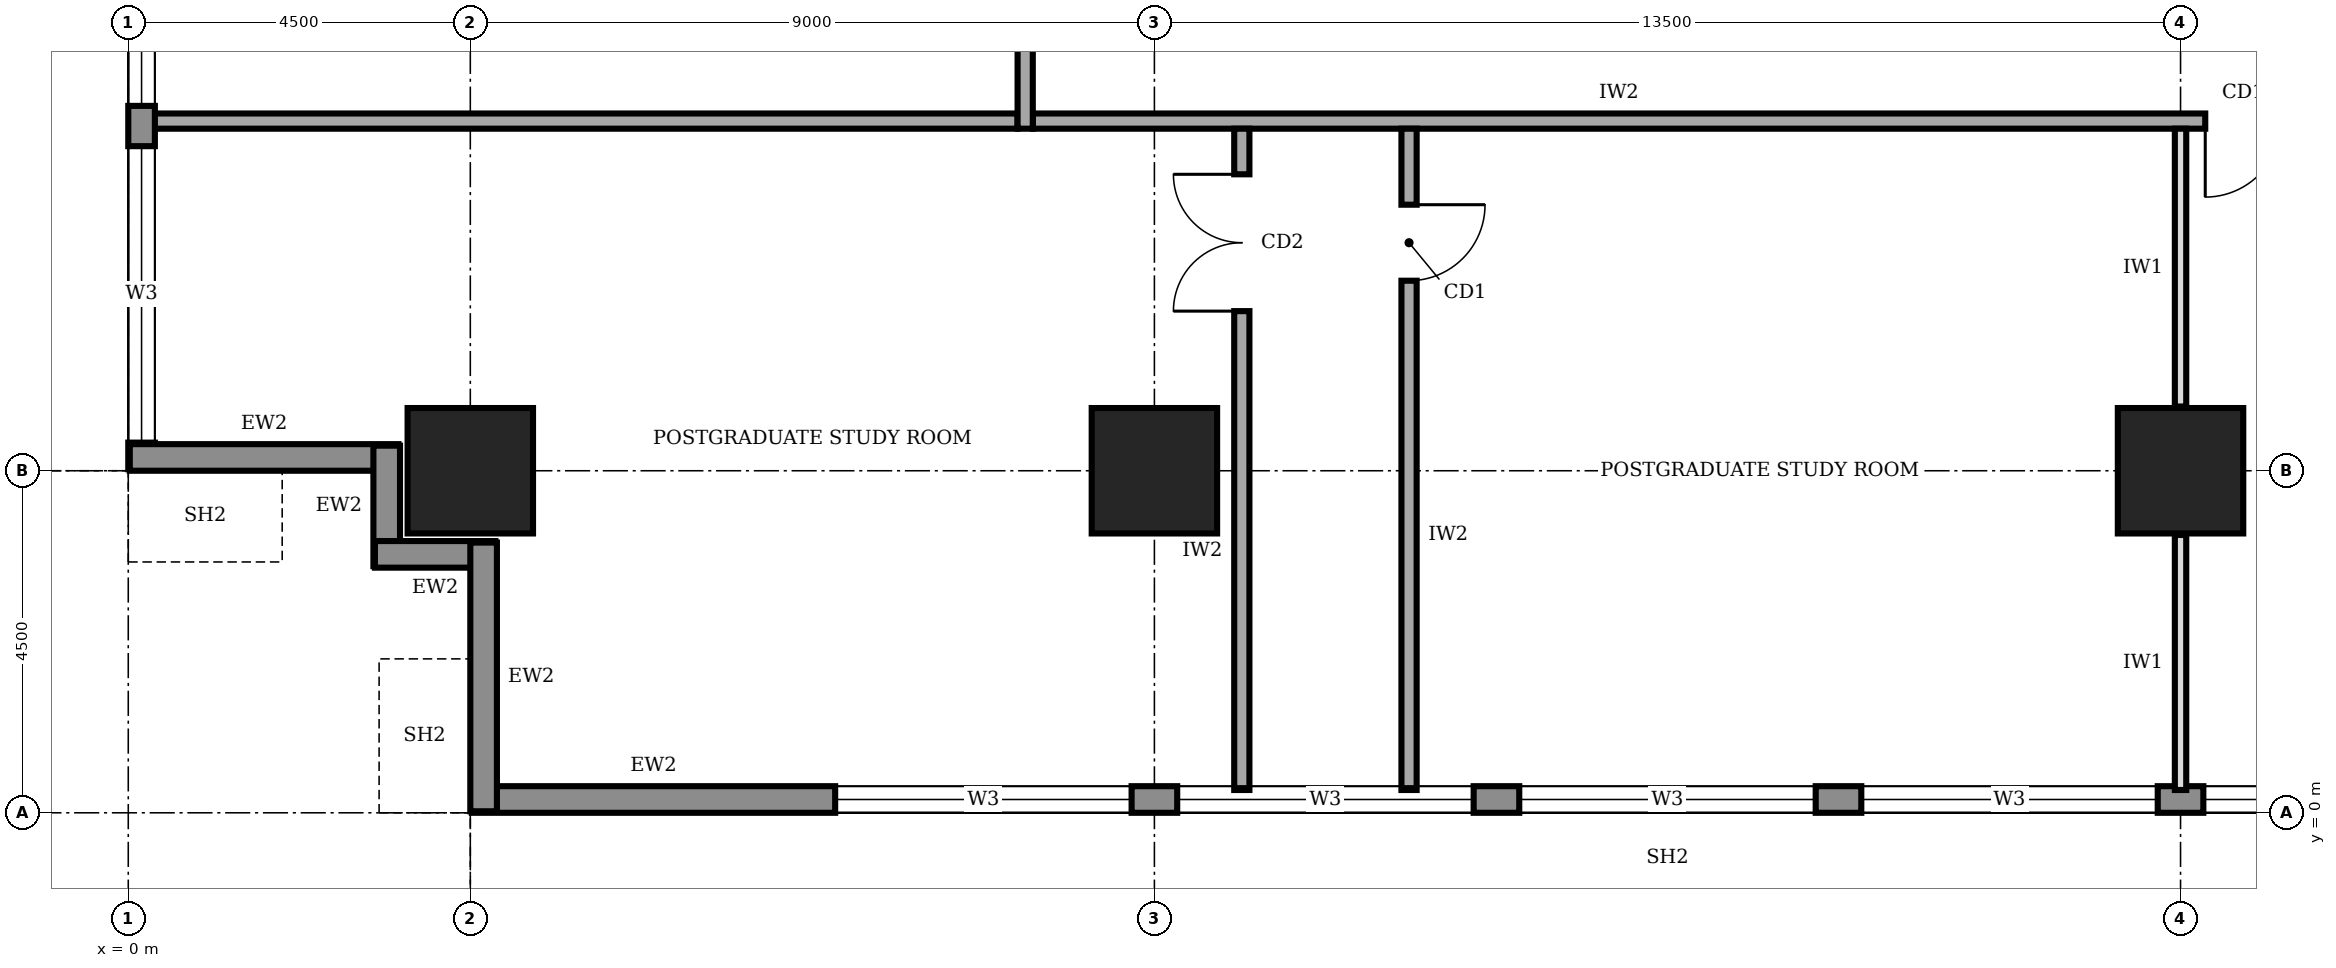
"""IFC4 building model, lengths in metres.
Left out: names, types, materials, properties, quantities, classifications, styles, units other than length and angle.
Written with IfcOpenShell. Run it as: python <this file> out.ifc"""

import sys

from ifc_helpers import new_model, si_unit, direction, frame, frame_2d, origin, origin_2d, place, context, subcontext, project, spatial, rectangle, extrude, element, fill, save


model = new_model("IFC4")
c1 = context("Model", 3, precision=1e-05, world=origin(), true_north=direction((0.0, 1.0)))
c2 = subcontext(c1, "Body", "Model", "MODEL_VIEW")
j1 = project(units=[si_unit("LENGTHUNIT", "METRE"), si_unit("PLANEANGLEUNIT", "RADIAN")], contexts=[c1])
p1 = place(None, origin())
s1 = spatial("IfcSite", under=j1, at=p1, CompositionType="ELEMENT")
p2 = place(p1, origin())
s2 = spatial("IfcBuilding", under=s1, at=p2, CompositionType="ELEMENT")
p3 = place(p2, frame((0.0, 0.0, 181.0)))
s3 = spatial("IfcBuildingStorey", under=s2, at=p3, CompositionType="ELEMENT", Elevation=181.0)
for number, where, z_axis, x_axis in (
    (1, (4.5, 4.5, 0.0), (0.0, 0.0, 1.0), (1.0, 0.0, 0.0)),
    (2, (13.5, 4.5, 0.0), (0.0, 0.0, 1.0), (1.0, 0.0, 0.0)),
    (3, (27.0, 4.5, 0.0), (0.0, 0.0, 1.0), (1.0, 0.0, 0.0)),
):
    element("IfcColumn", number, at=place(p3, frame(where, z_axis=z_axis, x_axis=x_axis)), inside=s3, PredefinedType="COLUMN", context=c2, shape_type="SweptSolid", body=[
        extrude(rectangle(XDim=1.65, YDim=1.65, at=origin_2d()), origin(), (0.0, 0.0, 1.0), 4.0),
    ])
p4 = place(p3, frame((4.52, 0.175, 0.0), z_axis=(0.0, 0.0, 1.0), x_axis=(1.0, 0.0, 0.0)))
e4 = element("IfcWall", 4, at=p4, inside=s3, PredefinedType="STANDARD", context=c2, shape_type="SweptSolid", body=[
    extrude(rectangle(XDim=31.46, YDim=0.35, at=frame_2d((15.73, 0.0))), origin(), (0.0, 0.0, 1.0), 3.75),
])
p5 = place(p4, frame((4.78, 0.0, 0.95)))
e5 = element("IfcOpeningElement", 5, at=p5, cuts=e4, PredefinedType="OPENING", context=c2, shape_type="SweptSolid", body=[
    extrude(rectangle(XDim=3.9, YDim=1.8, at=frame_2d((1.95, 0.9))), frame((0.0, 0.185, 0.0), z_axis=(0.0, -1.0, 0.0), x_axis=(1.0, 0.0, 0.0)), (0.0, 0.0, 1.0), 0.37),
])
p6 = place(p4, frame((9.28, 0.0, 0.95)))
e6 = element("IfcOpeningElement", 6, at=p6, cuts=e4, PredefinedType="OPENING", context=c2, shape_type="SweptSolid", body=[
    extrude(rectangle(XDim=3.9, YDim=1.8, at=frame_2d((1.95, 0.9))), frame((0.0, 0.185, 0.0), z_axis=(0.0, -1.0, 0.0), x_axis=(1.0, 0.0, 0.0)), (0.0, 0.0, 1.0), 0.37),
])
p7 = place(p4, frame((13.78, 0.0, 0.95)))
e7 = element("IfcOpeningElement", 7, at=p7, cuts=e4, PredefinedType="OPENING", context=c2, shape_type="SweptSolid", body=[
    extrude(rectangle(XDim=3.9, YDim=1.8, at=frame_2d((1.95, 0.9))), frame((0.0, 0.185, 0.0), z_axis=(0.0, -1.0, 0.0), x_axis=(1.0, 0.0, 0.0)), (0.0, 0.0, 1.0), 0.37),
])
p8 = place(p4, frame((18.28, 0.0, 0.95)))
e8 = element("IfcOpeningElement", 8, at=p8, cuts=e4, PredefinedType="OPENING", context=c2, shape_type="SweptSolid", body=[
    extrude(rectangle(XDim=3.9, YDim=1.8, at=frame_2d((1.95, 0.9))), frame((0.0, 0.185, 0.0), z_axis=(0.0, -1.0, 0.0), x_axis=(1.0, 0.0, 0.0)), (0.0, 0.0, 1.0), 0.37),
])
p9 = place(p4, frame((22.78, 0.0, 0.95)))
e9 = element("IfcOpeningElement", 9, at=p9, cuts=e4, PredefinedType="OPENING", context=c2, shape_type="SweptSolid", body=[
    extrude(rectangle(XDim=3.9, YDim=1.8, at=frame_2d((1.95, 0.9))), frame((0.0, 0.185, 0.0), z_axis=(0.0, -1.0, 0.0), x_axis=(1.0, 0.0, 0.0)), (0.0, 0.0, 1.0), 0.37),
])
p10 = place(p4, frame((27.21, 0.0, 0.95)))
e10 = element("IfcOpeningElement", 10, at=p10, cuts=e4, PredefinedType="OPENING", context=c2, shape_type="SweptSolid", body=[
    extrude(rectangle(XDim=3.9, YDim=1.8, at=frame_2d((1.95, 0.9))), frame((0.0, 0.185, 0.0), z_axis=(0.0, -1.0, 0.0), x_axis=(1.0, 0.0, 0.0)), (0.0, 0.0, 1.0), 0.37),
])
p11 = place(p3, frame((0.175, 35.98, 0.0), z_axis=(0.0, 0.0, 1.0), x_axis=(0.0, -1.0, 0.0)))
e11 = element("IfcWall", 11, at=p11, inside=s3, PredefinedType="STANDARD", context=c2, shape_type="SweptSolid", body=[
    extrude(rectangle(XDim=31.46, YDim=0.35, at=frame_2d((15.73, 0.0))), origin(), (0.0, 0.0, 1.0), 3.75),
])
p12 = place(p11, frame((27.21, 0.0, 0.95)))
e12 = element("IfcOpeningElement", 12, at=p12, cuts=e11, PredefinedType="OPENING", context=c2, shape_type="SweptSolid", body=[
    extrude(rectangle(XDim=3.9, YDim=1.8, at=frame_2d((1.95, 0.9))), frame((0.0, 0.185, 0.0), z_axis=(0.0, -1.0, 0.0), x_axis=(1.0, 0.0, 0.0)), (0.0, 0.0, 1.0), 0.37),
])
p13 = place(p11, frame((22.78, 0.0, 0.95)))
e13 = element("IfcOpeningElement", 13, at=p13, cuts=e11, PredefinedType="OPENING", context=c2, shape_type="SweptSolid", body=[
    extrude(rectangle(XDim=3.9, YDim=1.8, at=frame_2d((1.95, 0.9))), frame((0.0, 0.185, 0.0), z_axis=(0.0, -1.0, 0.0), x_axis=(1.0, 0.0, 0.0)), (0.0, 0.0, 1.0), 0.37),
])
p14 = place(p11, frame((18.28, 0.0, 0.95)))
e14 = element("IfcOpeningElement", 14, at=p14, cuts=e11, PredefinedType="OPENING", context=c2, shape_type="SweptSolid", body=[
    extrude(rectangle(XDim=3.9, YDim=1.8, at=frame_2d((1.95, 0.9))), frame((0.0, 0.185, 0.0), z_axis=(0.0, -1.0, 0.0), x_axis=(1.0, 0.0, 0.0)), (0.0, 0.0, 1.0), 0.37),
])
p15 = place(p11, frame((13.78, 0.0, 0.95)))
e15 = element("IfcOpeningElement", 15, at=p15, cuts=e11, PredefinedType="OPENING", context=c2, shape_type="SweptSolid", body=[
    extrude(rectangle(XDim=3.9, YDim=1.8, at=frame_2d((1.95, 0.9))), frame((0.0, 0.185, 0.0), z_axis=(0.0, -1.0, 0.0), x_axis=(1.0, 0.0, 0.0)), (0.0, 0.0, 1.0), 0.37),
])
p16 = place(p11, frame((9.28, 0.0, 0.95)))
e16 = element("IfcOpeningElement", 16, at=p16, cuts=e11, PredefinedType="OPENING", context=c2, shape_type="SweptSolid", body=[
    extrude(rectangle(XDim=3.9, YDim=1.8, at=frame_2d((1.95, 0.9))), frame((0.0, 0.185, 0.0), z_axis=(0.0, -1.0, 0.0), x_axis=(1.0, 0.0, 0.0)), (0.0, 0.0, 1.0), 0.37),
])
p17 = place(p11, frame((4.78, 0.0, 0.95)))
e17 = element("IfcOpeningElement", 17, at=p17, cuts=e11, PredefinedType="OPENING", context=c2, shape_type="SweptSolid", body=[
    extrude(rectangle(XDim=3.9, YDim=1.8, at=frame_2d((1.95, 0.9))), frame((0.0, 0.185, 0.0), z_axis=(0.0, -1.0, 0.0), x_axis=(1.0, 0.0, 0.0)), (0.0, 0.0, 1.0), 0.37),
])
p18 = place(p3, frame((0.02, 4.675, 0.0), z_axis=(0.0, 0.0, 1.0), x_axis=(1.0, 0.0, 0.0)))
e18 = element("IfcWall", 18, at=p18, inside=s3, PredefinedType="STANDARD", context=c2, shape_type="SweptSolid", body=[
    extrude(rectangle(XDim=3.535, YDim=0.35, at=frame_2d((1.768, 0.0))), origin(), (0.0, 0.0, 1.0), 2.85),
])
for number, where, z_axis, x_axis in (
    (19, (3.4, 4.83, 0.0), (0.0, 0.0, 1.0), (0.0, -1.0, 0.0)),
    (20, (3.245, 3.4, 0.0), (0.0, 0.0, 1.0), (1.0, 0.0, 0.0)),
):
    element("IfcWall", number, at=place(p3, frame(where, z_axis=z_axis, x_axis=x_axis)), inside=s3, PredefinedType="STANDARD", context=c2, shape_type="SweptSolid", body=[
        extrude(rectangle(XDim=1.585, YDim=0.35, at=frame_2d((0.792, 0.0))), origin(), (0.0, 0.0, 1.0), 3.75),
    ])
p19 = place(p3, frame((4.675, 3.555, 0.0), z_axis=(0.0, 0.0, 1.0), x_axis=(0.0, -1.0, 0.0)))
e21 = element("IfcWall", 21, at=p19, inside=s3, PredefinedType="STANDARD", context=c2, shape_type="SweptSolid", body=[
    extrude(rectangle(XDim=3.535, YDim=0.35, at=frame_2d((1.768, 0.0))), origin(), (0.0, 0.0, 1.0), 2.85),
])
p20 = place(p3, frame((11.9, 9.1, 0.0), z_axis=(0.0, 0.0, 1.0), x_axis=(1.0, 0.0, 0.0)))
e22 = element("IfcWall", 22, at=p20, inside=s3, PredefinedType="SOLIDWALL", context=c2, shape_type="SweptSolid", body=[
    extrude(rectangle(XDim=16.9, YDim=0.2, at=frame_2d((8.45, 0.0))), origin(), (0.0, 0.0, 1.0), 3.75),
])
p21 = place(p20, frame((15.425, 0.0, 0.0)))
e23 = element("IfcOpeningElement", 23, at=p21, cuts=e22, PredefinedType="OPENING", context=c2, shape_type="SweptSolid", body=[
    extrude(rectangle(XDim=1.0, YDim=2.1, at=frame_2d((0.5, 1.05))), frame((0.0, 0.11, 0.0), z_axis=(0.0, -1.0, 0.0), x_axis=(1.0, 0.0, 0.0)), (0.0, 0.0, 1.0), 0.22),
])
p22 = place(p3, frame((11.8, 31.3, 0.0), z_axis=(0.0, 0.0, 1.0), x_axis=(0.0, -1.0, 0.0)))
e24 = element("IfcWall", 24, at=p22, inside=s3, PredefinedType="SOLIDWALL", context=c2, shape_type="SweptSolid", body=[
    extrude(rectangle(XDim=22.3, YDim=0.2, at=frame_2d((11.15, 0.0))), origin(), (0.0, 0.0, 1.0), 3.75),
])
p23 = place(p22, frame((19.55, 0.0, 0.0)))
e25 = element("IfcOpeningElement", 25, at=p23, cuts=e24, PredefinedType="OPENING", context=c2, shape_type="SweptSolid", body=[
    extrude(rectangle(XDim=1.0, YDim=2.1, at=frame_2d((0.5, 1.05))), frame((0.0, 0.11, 0.0), z_axis=(0.0, -1.0, 0.0), x_axis=(1.0, 0.0, 0.0)), (0.0, 0.0, 1.0), 0.22),
])
p24 = place(p22, frame((16.15, 0.0, 0.0)))
e26 = element("IfcOpeningElement", 26, at=p24, cuts=e24, PredefinedType="OPENING", context=c2, shape_type="SweptSolid", body=[
    extrude(rectangle(XDim=0.9, YDim=2.1, at=frame_2d((0.45, 1.05))), frame((0.0, 0.11, 0.0), z_axis=(0.0, -1.0, 0.0), x_axis=(1.0, 0.0, 0.0)), (0.0, 0.0, 1.0), 0.22),
])
p25 = place(p22, frame((12.95, 0.0, 0.0)))
e27 = element("IfcOpeningElement", 27, at=p25, cuts=e24, PredefinedType="OPENING", context=c2, shape_type="SweptSolid", body=[
    extrude(rectangle(XDim=0.9, YDim=2.1, at=frame_2d((0.45, 1.05))), frame((0.0, 0.11, 0.0), z_axis=(0.0, -1.0, 0.0), x_axis=(1.0, 0.0, 0.0)), (0.0, 0.0, 1.0), 0.22),
])
p26 = place(p22, frame((7.4, 0.0, 0.0)))
e28 = element("IfcOpeningElement", 28, at=p26, cuts=e24, PredefinedType="OPENING", context=c2, shape_type="SweptSolid", body=[
    extrude(rectangle(XDim=0.9, YDim=2.1, at=frame_2d((0.45, 1.05))), frame((0.0, 0.11, 0.0), z_axis=(0.0, -1.0, 0.0), x_axis=(1.0, 0.0, 0.0)), (0.0, 0.0, 1.0), 0.22),
])
p27 = place(p22, frame((4.8, 0.0, 0.0)))
e29 = element("IfcOpeningElement", 29, at=p27, cuts=e24, PredefinedType="OPENING", context=c2, shape_type="SweptSolid", body=[
    extrude(rectangle(XDim=1.0, YDim=2.1, at=frame_2d((0.5, 1.05))), frame((0.0, 0.11, 0.0), z_axis=(0.0, -1.0, 0.0), x_axis=(1.0, 0.0, 0.0)), (0.0, 0.0, 1.0), 0.22),
])
p28 = place(p22, frame((9.9, 0.0, 0.0)))
e30 = element("IfcOpeningElement", 30, at=p28, cuts=e24, PredefinedType="OPENING", context=c2, shape_type="SweptSolid", body=[
    extrude(rectangle(XDim=1.0, YDim=2.1, at=frame_2d((0.5, 1.05))), frame((0.0, 0.11, 0.0), z_axis=(0.0, -1.0, 0.0), x_axis=(1.0, 0.0, 0.0)), (0.0, 0.0, 1.0), 0.22),
])
p29 = place(p22, frame((1.55, 0.0, 0.0)))
e31 = element("IfcOpeningElement", 31, at=p29, cuts=e24, PredefinedType="OPENING", context=c2, shape_type="SweptSolid", body=[
    extrude(rectangle(XDim=1.0, YDim=2.1, at=frame_2d((0.5, 1.05))), frame((0.0, 0.11, 0.0), z_axis=(0.0, -1.0, 0.0), x_axis=(1.0, 0.0, 0.0)), (0.0, 0.0, 1.0), 0.22),
])
p30 = place(p3, frame((14.65, 0.3, 0.0), z_axis=(0.0, 0.0, 1.0), x_axis=(0.0, 1.0, 0.0)))
e32 = element("IfcWall", 32, at=p30, inside=s3, PredefinedType="SOLIDWALL", context=c2, shape_type="SweptSolid", body=[
    extrude(rectangle(XDim=8.7, YDim=0.2, at=frame_2d((4.35, 0.0))), origin(), (0.0, 0.0, 1.0), 3.75),
])
p31 = place(p30, frame((6.3, 0.0, 0.0)))
e33 = element("IfcOpeningElement", 33, at=p31, cuts=e32, PredefinedType="OPENING", context=c2, shape_type="SweptSolid", body=[
    extrude(rectangle(XDim=1.8, YDim=2.1, at=frame_2d((0.9, 1.05))), frame((0.0, 0.11, 0.0), z_axis=(0.0, -1.0, 0.0), x_axis=(1.0, 0.0, 0.0)), (0.0, 0.0, 1.0), 0.22),
])
p32 = place(p3, frame((16.85, 9.0, 0.0), z_axis=(0.0, 0.0, 1.0), x_axis=(0.0, -1.0, 0.0)))
e34 = element("IfcWall", 34, at=p32, inside=s3, PredefinedType="SOLIDWALL", context=c2, shape_type="SweptSolid", body=[
    extrude(rectangle(XDim=8.7, YDim=0.2, at=frame_2d((4.35, 0.0))), origin(), (0.0, 0.0, 1.0), 3.75),
])
p33 = place(p32, frame((1.0, 0.0, 0.0)))
e35 = element("IfcOpeningElement", 35, at=p33, cuts=e34, PredefinedType="OPENING", context=c2, shape_type="SweptSolid", body=[
    extrude(rectangle(XDim=1.0, YDim=2.1, at=frame_2d((0.5, 1.05))), frame((0.0, 0.11, 0.0), z_axis=(0.0, -1.0, 0.0), x_axis=(1.0, 0.0, 0.0)), (0.0, 0.0, 1.0), 0.22),
])
p34 = place(p3, frame((0.3, 9.1, 0.0), z_axis=(0.0, 0.0, 1.0), x_axis=(1.0, 0.0, 0.0)))
e36 = element("IfcWall", 36, at=p34, inside=s3, PredefinedType="SOLIDWALL", context=c2, shape_type="SweptSolid", body=[
    extrude(rectangle(XDim=11.4, YDim=0.2, at=frame_2d((5.7, 0.0))), origin(), (0.0, 0.0, 1.0), 3.75),
])
p35 = place(p3, frame((27.0, 0.3, 0.0), z_axis=(0.0, 0.0, 1.0), x_axis=(0.0, 1.0, 0.0)))
e37 = element("IfcWall", 37, at=p35, inside=s3, PredefinedType="PARTITIONING", context=c2, shape_type="SweptSolid", body=[
    extrude(rectangle(XDim=3.355, YDim=0.15, at=frame_2d((1.677, 0.0))), origin(), (0.0, 0.0, 1.0), 2.85),
])
p36 = place(p3, frame((27.0, 5.345, 0.0), z_axis=(0.0, 0.0, 1.0), x_axis=(0.0, 1.0, 0.0)))
e38 = element("IfcWall", 38, at=p36, inside=s3, PredefinedType="PARTITIONING", context=c2, shape_type="SweptSolid", body=[
    extrude(rectangle(XDim=3.655, YDim=0.15, at=frame_2d((1.828, 0.0))), origin(), (0.0, 0.0, 1.0), 2.85),
])
p37 = place(p5, origin())
e39 = element("IfcWindow", 39, at=p37, inside=s3, PartitioningType="SINGLE_PANEL", PredefinedType="WINDOW", context=c2, shape_type="SweptSolid", body=[
    extrude(rectangle(XDim=3.9, YDim=1.8, at=frame_2d((1.95, 0.9))), frame((0.0, 0.03, 0.0), z_axis=(0.0, -1.0, 0.0), x_axis=(1.0, 0.0, 0.0)), (0.0, 0.0, 1.0), 0.06),
])
fill(e5, e39)
p38 = place(p6, origin())
e40 = element("IfcWindow", 40, at=p38, inside=s3, PartitioningType="SINGLE_PANEL", PredefinedType="WINDOW", context=c2, shape_type="SweptSolid", body=[
    extrude(rectangle(XDim=3.9, YDim=1.8, at=frame_2d((1.95, 0.9))), frame((0.0, 0.03, 0.0), z_axis=(0.0, -1.0, 0.0), x_axis=(1.0, 0.0, 0.0)), (0.0, 0.0, 1.0), 0.06),
])
fill(e6, e40)
p39 = place(p7, origin())
e41 = element("IfcWindow", 41, at=p39, inside=s3, PartitioningType="SINGLE_PANEL", PredefinedType="WINDOW", context=c2, shape_type="SweptSolid", body=[
    extrude(rectangle(XDim=3.9, YDim=1.8, at=frame_2d((1.95, 0.9))), frame((0.0, 0.03, 0.0), z_axis=(0.0, -1.0, 0.0), x_axis=(1.0, 0.0, 0.0)), (0.0, 0.0, 1.0), 0.06),
])
fill(e7, e41)
p40 = place(p8, origin())
e42 = element("IfcWindow", 42, at=p40, inside=s3, PartitioningType="SINGLE_PANEL", PredefinedType="WINDOW", context=c2, shape_type="SweptSolid", body=[
    extrude(rectangle(XDim=3.9, YDim=1.8, at=frame_2d((1.95, 0.9))), frame((0.0, 0.03, 0.0), z_axis=(0.0, -1.0, 0.0), x_axis=(1.0, 0.0, 0.0)), (0.0, 0.0, 1.0), 0.06),
])
fill(e8, e42)
p41 = place(p9, origin())
e43 = element("IfcWindow", 43, at=p41, inside=s3, PartitioningType="SINGLE_PANEL", PredefinedType="WINDOW", context=c2, shape_type="SweptSolid", body=[
    extrude(rectangle(XDim=3.9, YDim=1.8, at=frame_2d((1.95, 0.9))), frame((0.0, 0.03, 0.0), z_axis=(0.0, -1.0, 0.0), x_axis=(1.0, 0.0, 0.0)), (0.0, 0.0, 1.0), 0.06),
])
fill(e9, e43)
p42 = place(p12, origin())
e44 = element("IfcWindow", 44, at=p42, inside=s3, PartitioningType="SINGLE_PANEL", PredefinedType="WINDOW", context=c2, shape_type="SweptSolid", body=[
    extrude(rectangle(XDim=3.9, YDim=1.8, at=frame_2d((1.95, 0.9))), frame((0.0, 0.03, 0.0), z_axis=(0.0, -1.0, 0.0), x_axis=(1.0, 0.0, 0.0)), (0.0, 0.0, 1.0), 0.06),
])
fill(e12, e44)
p43 = place(p13, origin())
e45 = element("IfcWindow", 45, at=p43, inside=s3, PartitioningType="SINGLE_PANEL", PredefinedType="WINDOW", context=c2, shape_type="SweptSolid", body=[
    extrude(rectangle(XDim=3.9, YDim=1.8, at=frame_2d((1.95, 0.9))), frame((0.0, 0.03, 0.0), z_axis=(0.0, -1.0, 0.0), x_axis=(1.0, 0.0, 0.0)), (0.0, 0.0, 1.0), 0.06),
])
fill(e13, e45)
p44 = place(p21, frame((1.0, 0.0, 0.0), z_axis=(0.0, 0.0, 1.0), x_axis=(-1.0, 0.0, 0.0)))
e46 = element("IfcDoor", 46, at=p44, inside=s3, OperationType="SINGLE_SWING_RIGHT", PredefinedType="DOOR", context=c2, shape_type="SweptSolid", body=[
    extrude(rectangle(XDim=1.0, YDim=2.1, at=frame_2d((0.5, 1.05))), frame((0.0, 0.025, 0.0), z_axis=(0.0, -1.0, 0.0), x_axis=(1.0, 0.0, 0.0)), (0.0, 0.0, 1.0), 0.05),
])
fill(e23, e46)
p45 = place(p31, origin())
e47 = element("IfcDoor", 47, at=p45, inside=s3, OperationType="DOUBLE_DOOR_SINGLE_SWING", PredefinedType="DOOR", context=c2, shape_type="SweptSolid", body=[
    extrude(rectangle(XDim=1.8, YDim=2.1, at=frame_2d((0.9, 1.05))), frame((0.0, 0.025, 0.0), z_axis=(0.0, -1.0, 0.0), x_axis=(1.0, 0.0, 0.0)), (0.0, 0.0, 1.0), 0.05),
])
fill(e33, e47)
p46 = place(p33, origin())
e48 = element("IfcDoor", 48, at=p46, inside=s3, OperationType="SINGLE_SWING_LEFT", PredefinedType="DOOR", context=c2, shape_type="SweptSolid", body=[
    extrude(rectangle(XDim=1.0, YDim=2.1, at=frame_2d((0.5, 1.05))), frame((0.0, 0.025, 0.0), z_axis=(0.0, -1.0, 0.0), x_axis=(1.0, 0.0, 0.0)), (0.0, 0.0, 1.0), 0.05),
])
fill(e35, e48)
save(model, sys.argv[1])
